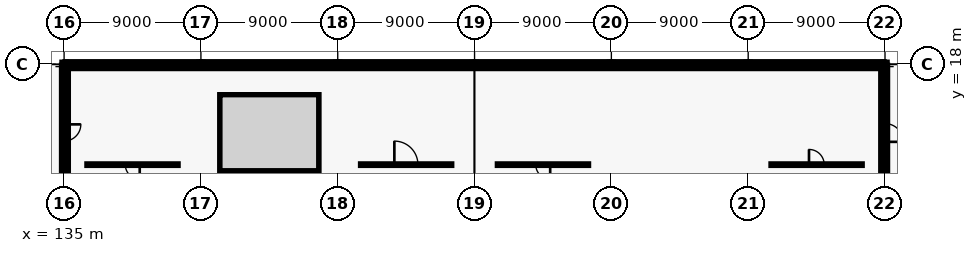
"""IFC4 building model, lengths in metres.
Left out: names, types, materials, properties, quantities, classifications, styles, units other than length and angle.
Written with IfcOpenShell. Run it as: python <this file> out.ifc"""

import sys

from ifc_helpers import new_model, si_unit, direction, frame, frame_2d, origin, origin_2d, place, context, subcontext, project, spatial, rectangle, i_section, extrude, element, fill, save


model = new_model("IFC4")
c1 = context("Model", 3, precision=1e-05, world=origin(), true_north=direction((0.0, 1.0)))
c2 = subcontext(c1, "Body", "Model", "MODEL_VIEW")
j1 = project(units=[si_unit("LENGTHUNIT", "METRE"), si_unit("PLANEANGLEUNIT", "RADIAN")], contexts=[c1])
p1 = place(None, origin())
s1 = spatial("IfcSite", under=j1, at=p1, CompositionType="ELEMENT")
p2 = place(p1, origin())
s2 = spatial("IfcBuilding", under=s1, at=p2, CompositionType="ELEMENT")
p3 = place(p2, frame((0.0, 0.0, 13.5)))
s3 = spatial("IfcBuildingStorey", under=s2, at=p3, CompositionType="ELEMENT", Elevation=13.5)
for number, where, z_axis, x_axis in (
    (1, (135.0, 18.0, 0.0), (0.0, 0.0, 1.0), (1.0, 0.0, 0.0)),
    (2, (144.0, 18.0, 0.0), (0.0, 0.0, 1.0), (1.0, 0.0, 0.0)),
    (3, (153.0, 18.0, 0.0), (0.0, 0.0, 1.0), (1.0, 0.0, 0.0)),
    (4, (162.0, 18.0, 0.0), (0.0, 0.0, 1.0), (1.0, 0.0, 0.0)),
    (5, (171.0, 18.0, 0.0), (0.0, 0.0, 1.0), (1.0, 0.0, 0.0)),
    (6, (180.0, 18.0, 0.0), (0.0, 0.0, 1.0), (1.0, 0.0, 0.0)),
    (7, (189.0, 18.0, 0.0), (0.0, 0.0, 1.0), (1.0, 0.0, 0.0)),
):
    element("IfcColumn", number, at=place(p3, frame(where, z_axis=z_axis, x_axis=x_axis)), inside=s3, PredefinedType="COLUMN", context=c2, shape_type="SweptSolid", body=[
        extrude(i_section(OverallWidth=0.28, OverallDepth=0.28, WebThickness=0.01, FlangeThickness=0.018, FilletRadius=0.024, at=origin_2d()), origin(), (0.0, 0.0, 1.0), 3.9),
    ])
p4 = place(p3, frame((135.06, 18.0, 0.0), z_axis=(0.0, 0.0, 1.0), x_axis=(1.0, 0.0, 0.0)))
e8 = element("IfcWall", 8, at=p4, inside=s3, PredefinedType="SOLIDWALL", context=c2, shape_type="SweptSolid", body=[
    extrude(rectangle(XDim=8.88, YDim=0.34, at=frame_2d((4.44, 0.0))), origin(), (0.0, 0.0, 1.0), 3.2),
])
p5 = place(p4, frame((1.486, 0.0, 0.9)))
e9 = element("IfcOpeningElement", 9, at=p5, cuts=e8, PredefinedType="OPENING", context=c2, shape_type="SweptSolid", body=[
    extrude(rectangle(XDim=2.0, YDim=1.5, at=frame_2d((1.0, 0.75))), frame((0.0, 0.18, 0.0), z_axis=(0.0, -1.0, 0.0), x_axis=(1.0, 0.0, 0.0)), (0.0, 0.0, 1.0), 0.36),
])
p6 = place(p4, frame((5.394, 0.0, 0.9)))
e10 = element("IfcOpeningElement", 10, at=p6, cuts=e8, PredefinedType="OPENING", context=c2, shape_type="SweptSolid", body=[
    extrude(rectangle(XDim=2.0, YDim=1.5, at=frame_2d((1.0, 0.75))), frame((0.0, 0.18, 0.0), z_axis=(0.0, -1.0, 0.0), x_axis=(1.0, 0.0, 0.0)), (0.0, 0.0, 1.0), 0.36),
])
p7 = place(p3, frame((144.06, 18.0, 0.0), z_axis=(0.0, 0.0, 1.0), x_axis=(1.0, 0.0, 0.0)))
e11 = element("IfcWall", 11, at=p7, inside=s3, PredefinedType="SOLIDWALL", context=c2, shape_type="SweptSolid", body=[
    extrude(rectangle(XDim=8.88, YDim=0.34, at=frame_2d((4.44, 0.0))), origin(), (0.0, 0.0, 1.0), 3.2),
])
p8 = place(p7, frame((1.186, 0.0, 0.9)))
e12 = element("IfcOpeningElement", 12, at=p8, cuts=e11, PredefinedType="OPENING", context=c2, shape_type="SweptSolid", body=[
    extrude(rectangle(XDim=2.6, YDim=1.4, at=frame_2d((1.3, 0.7))), frame((0.0, 0.18, 0.0), z_axis=(0.0, -1.0, 0.0), x_axis=(1.0, 0.0, 0.0)), (0.0, 0.0, 1.0), 0.36),
])
p9 = place(p7, frame((5.094, 0.0, 0.9)))
e13 = element("IfcOpeningElement", 13, at=p9, cuts=e11, PredefinedType="OPENING", context=c2, shape_type="SweptSolid", body=[
    extrude(rectangle(XDim=2.6, YDim=1.4, at=frame_2d((1.3, 0.7))), frame((0.0, 0.18, 0.0), z_axis=(0.0, -1.0, 0.0), x_axis=(1.0, 0.0, 0.0)), (0.0, 0.0, 1.0), 0.36),
])
p10 = place(p3, frame((153.06, 18.0, 0.0), z_axis=(0.0, 0.0, 1.0), x_axis=(1.0, 0.0, 0.0)))
e14 = element("IfcWall", 14, at=p10, inside=s3, PredefinedType="SOLIDWALL", context=c2, shape_type="SweptSolid", body=[
    extrude(rectangle(XDim=8.88, YDim=0.34, at=frame_2d((4.44, 0.0))), origin(), (0.0, 0.0, 1.0), 3.2),
])
p11 = place(p10, frame((1.486, 0.0, 0.9)))
e15 = element("IfcOpeningElement", 15, at=p11, cuts=e14, PredefinedType="OPENING", context=c2, shape_type="SweptSolid", body=[
    extrude(rectangle(XDim=2.0, YDim=1.5, at=frame_2d((1.0, 0.75))), frame((0.0, 0.18, 0.0), z_axis=(0.0, -1.0, 0.0), x_axis=(1.0, 0.0, 0.0)), (0.0, 0.0, 1.0), 0.36),
])
p12 = place(p10, frame((5.394, 0.0, 0.9)))
e16 = element("IfcOpeningElement", 16, at=p12, cuts=e14, PredefinedType="OPENING", context=c2, shape_type="SweptSolid", body=[
    extrude(rectangle(XDim=2.0, YDim=1.5, at=frame_2d((1.0, 0.75))), frame((0.0, 0.18, 0.0), z_axis=(0.0, -1.0, 0.0), x_axis=(1.0, 0.0, 0.0)), (0.0, 0.0, 1.0), 0.36),
])
p13 = place(p3, frame((162.06, 18.0, 0.0), z_axis=(0.0, 0.0, 1.0), x_axis=(1.0, 0.0, 0.0)))
e17 = element("IfcWall", 17, at=p13, inside=s3, PredefinedType="SOLIDWALL", context=c2, shape_type="SweptSolid", body=[
    extrude(rectangle(XDim=8.88, YDim=0.34, at=frame_2d((4.44, 0.0))), origin(), (0.0, 0.0, 1.0), 3.2),
])
p14 = place(p13, frame((1.186, 0.0, 0.9)))
e18 = element("IfcOpeningElement", 18, at=p14, cuts=e17, PredefinedType="OPENING", context=c2, shape_type="SweptSolid", body=[
    extrude(rectangle(XDim=2.6, YDim=1.4, at=frame_2d((1.3, 0.7))), frame((0.0, 0.18, 0.0), z_axis=(0.0, -1.0, 0.0), x_axis=(1.0, 0.0, 0.0)), (0.0, 0.0, 1.0), 0.36),
])
p15 = place(p13, frame((5.094, 0.0, 0.9)))
e19 = element("IfcOpeningElement", 19, at=p15, cuts=e17, PredefinedType="OPENING", context=c2, shape_type="SweptSolid", body=[
    extrude(rectangle(XDim=2.6, YDim=1.4, at=frame_2d((1.3, 0.7))), frame((0.0, 0.18, 0.0), z_axis=(0.0, -1.0, 0.0), x_axis=(1.0, 0.0, 0.0)), (0.0, 0.0, 1.0), 0.36),
])
p16 = place(p3, frame((171.06, 18.0, 0.0), z_axis=(0.0, 0.0, 1.0), x_axis=(1.0, 0.0, 0.0)))
e20 = element("IfcWall", 20, at=p16, inside=s3, PredefinedType="SOLIDWALL", context=c2, shape_type="SweptSolid", body=[
    extrude(rectangle(XDim=8.88, YDim=0.34, at=frame_2d((4.44, 0.0))), origin(), (0.0, 0.0, 1.0), 3.2),
])
p17 = place(p16, frame((1.486, 0.0, 0.9)))
e21 = element("IfcOpeningElement", 21, at=p17, cuts=e20, PredefinedType="OPENING", context=c2, shape_type="SweptSolid", body=[
    extrude(rectangle(XDim=2.0, YDim=1.5, at=frame_2d((1.0, 0.75))), frame((0.0, 0.18, 0.0), z_axis=(0.0, -1.0, 0.0), x_axis=(1.0, 0.0, 0.0)), (0.0, 0.0, 1.0), 0.36),
])
p18 = place(p16, frame((5.394, 0.0, 0.9)))
e22 = element("IfcOpeningElement", 22, at=p18, cuts=e20, PredefinedType="OPENING", context=c2, shape_type="SweptSolid", body=[
    extrude(rectangle(XDim=2.0, YDim=1.5, at=frame_2d((1.0, 0.75))), frame((0.0, 0.18, 0.0), z_axis=(0.0, -1.0, 0.0), x_axis=(1.0, 0.0, 0.0)), (0.0, 0.0, 1.0), 0.36),
])
p19 = place(p3, frame((180.06, 18.0, 0.0), z_axis=(0.0, 0.0, 1.0), x_axis=(1.0, 0.0, 0.0)))
e23 = element("IfcWall", 23, at=p19, inside=s3, PredefinedType="SOLIDWALL", context=c2, shape_type="SweptSolid", body=[
    extrude(rectangle(XDim=8.88, YDim=0.34, at=frame_2d((4.44, 0.0))), origin(), (0.0, 0.0, 1.0), 3.2),
])
p20 = place(p19, frame((1.186, 0.0, 0.9)))
e24 = element("IfcOpeningElement", 24, at=p20, cuts=e23, PredefinedType="OPENING", context=c2, shape_type="SweptSolid", body=[
    extrude(rectangle(XDim=2.6, YDim=1.4, at=frame_2d((1.3, 0.7))), frame((0.0, 0.18, 0.0), z_axis=(0.0, -1.0, 0.0), x_axis=(1.0, 0.0, 0.0)), (0.0, 0.0, 1.0), 0.36),
])
p21 = place(p19, frame((5.094, 0.0, 0.9)))
e25 = element("IfcOpeningElement", 25, at=p21, cuts=e23, PredefinedType="OPENING", context=c2, shape_type="SweptSolid", body=[
    extrude(rectangle(XDim=2.6, YDim=1.4, at=frame_2d((1.3, 0.7))), frame((0.0, 0.18, 0.0), z_axis=(0.0, -1.0, 0.0), x_axis=(1.0, 0.0, 0.0)), (0.0, 0.0, 1.0), 0.36),
])
p22 = place(p3, frame((135.0, 9.06, 0.0), z_axis=(0.0, 0.0, 1.0), x_axis=(0.0, 1.0, 0.0)))
e26 = element("IfcWall", 26, at=p22, inside=s3, PredefinedType="SOLIDWALL", context=c2, shape_type="SweptSolid", body=[
    extrude(rectangle(XDim=8.88, YDim=0.34, at=frame_2d((4.44, 0.0))), origin(), (0.0, 0.0, 1.0), 3.2),
])
p23 = place(p22, frame((3.89, 0.0, 0.0)))
e27 = element("IfcOpeningElement", 27, at=p23, cuts=e26, PredefinedType="OPENING", context=c2, shape_type="SweptSolid", body=[
    extrude(rectangle(XDim=1.1, YDim=2.15, at=frame_2d((0.55, 1.075))), frame((0.0, 0.18, 0.0), z_axis=(0.0, -1.0, 0.0), x_axis=(1.0, 0.0, 0.0)), (0.0, 0.0, 1.0), 0.36),
])
p24 = place(p3, frame((189.0, 9.06, 0.0), z_axis=(0.0, 0.0, 1.0), x_axis=(0.0, 1.0, 0.0)))
e28 = element("IfcWall", 28, at=p24, inside=s3, PredefinedType="SOLIDWALL", context=c2, shape_type="SweptSolid", body=[
    extrude(rectangle(XDim=8.88, YDim=0.34, at=frame_2d((4.44, 0.0))), origin(), (0.0, 0.0, 1.0), 3.2),
])
p25 = place(p24, frame((3.84, 0.0, 0.0)))
e29 = element("IfcOpeningElement", 29, at=p25, cuts=e28, PredefinedType="OPENING", context=c2, shape_type="SweptSolid", body=[
    extrude(rectangle(XDim=1.2, YDim=2.15, at=frame_2d((0.6, 1.075))), frame((0.0, 0.18, 0.0), z_axis=(0.0, -1.0, 0.0), x_axis=(1.0, 0.0, 0.0)), (0.0, 0.0, 1.0), 0.36),
])
p26 = place(p3, frame((135.14, 17.86, 3.9), z_axis=(0.0, 0.0, 1.0), x_axis=(1.0, 0.0, 0.0)))
e30 = element("IfcWall", 30, at=p26, inside=s3, PredefinedType="PARAPET", context=c2, shape_type="SweptSolid", body=[
    extrude(rectangle(XDim=53.72, YDim=0.28, at=frame_2d((26.86, 0.0))), origin(), (0.0, 0.0, 1.0), 1.2),
])
for number, where, z_axis, x_axis in (
    (31, (135.14, 0.14, 3.9), (0.0, 0.0, 1.0), (0.0, 1.0, 0.0)),
    (32, (188.86, 0.14, 3.9), (0.0, 0.0, 1.0), (0.0, 1.0, 0.0)),
):
    element("IfcWall", number, at=place(p3, frame(where, z_axis=z_axis, x_axis=x_axis)), inside=s3, PredefinedType="PARAPET", context=c2, shape_type="SweptSolid", body=[
        extrude(rectangle(XDim=17.72, YDim=0.28, at=frame_2d((8.86, 0.0))), origin(), (0.0, 0.0, 1.0), 1.2),
    ])
p27 = place(p3, frame((136.5, 11.4, 0.0), z_axis=(0.0, 0.0, 1.0), x_axis=(1.0, 0.0, 0.0)))
e33 = element("IfcWall", 33, at=p27, inside=s3, PredefinedType="PARTITIONING", context=c2, shape_type="SweptSolid", body=[
    extrude(rectangle(XDim=6.0, YDim=0.1, at=frame_2d((3.0, 0.0))), origin(), (0.0, 0.0, 1.0), 2.9),
])
p28 = place(p27, frame((2.525, 0.0, 0.0)))
e34 = element("IfcOpeningElement", 34, at=p28, cuts=e33, PredefinedType="OPENING", context=c2, shape_type="SweptSolid", body=[
    extrude(rectangle(XDim=0.95, YDim=2.1, at=frame_2d((0.475, 1.05))), frame((0.0, 0.06, 0.0), z_axis=(0.0, -1.0, 0.0), x_axis=(1.0, 0.0, 0.0)), (0.0, 0.0, 1.0), 0.12),
])
p29 = place(p3, frame((154.5, 11.4, 0.0), z_axis=(0.0, 0.0, 1.0), x_axis=(1.0, 0.0, 0.0)))
e35 = element("IfcWall", 35, at=p29, inside=s3, PredefinedType="PARTITIONING", context=c2, shape_type="SweptSolid", body=[
    extrude(rectangle(XDim=6.0, YDim=0.1, at=frame_2d((3.0, 0.0))), origin(), (0.0, 0.0, 1.0), 2.9),
])
p30 = place(p29, frame((2.225, 0.0, 0.0)))
e36 = element("IfcOpeningElement", 36, at=p30, cuts=e35, PredefinedType="OPENING", context=c2, shape_type="SweptSolid", body=[
    extrude(rectangle(XDim=1.55, YDim=2.25, at=frame_2d((0.775, 1.125))), frame((0.0, 0.06, 0.0), z_axis=(0.0, -1.0, 0.0), x_axis=(1.0, 0.0, 0.0)), (0.0, 0.0, 1.0), 0.12),
])
p31 = place(p3, frame((163.5, 11.4, 0.0), z_axis=(0.0, 0.0, 1.0), x_axis=(1.0, 0.0, 0.0)))
e37 = element("IfcWall", 37, at=p31, inside=s3, PredefinedType="PARTITIONING", context=c2, shape_type="SweptSolid", body=[
    extrude(rectangle(XDim=6.0, YDim=0.1, at=frame_2d((3.0, 0.0))), origin(), (0.0, 0.0, 1.0), 2.9),
])
p32 = place(p31, frame((2.525, 0.0, 0.0)))
e38 = element("IfcOpeningElement", 38, at=p32, cuts=e37, PredefinedType="OPENING", context=c2, shape_type="SweptSolid", body=[
    extrude(rectangle(XDim=0.95, YDim=2.1, at=frame_2d((0.475, 1.05))), frame((0.0, 0.06, 0.0), z_axis=(0.0, -1.0, 0.0), x_axis=(1.0, 0.0, 0.0)), (0.0, 0.0, 1.0), 0.12),
])
p33 = place(p3, frame((181.5, 11.4, 0.0), z_axis=(0.0, 0.0, 1.0), x_axis=(1.0, 0.0, 0.0)))
e39 = element("IfcWall", 39, at=p33, inside=s3, PredefinedType="PARTITIONING", context=c2, shape_type="SweptSolid", body=[
    extrude(rectangle(XDim=6.0, YDim=0.1, at=frame_2d((3.0, 0.0))), origin(), (0.0, 0.0, 1.0), 2.9),
])
p34 = place(p33, frame((2.5, 0.0, 0.0)))
e40 = element("IfcOpeningElement", 40, at=p34, cuts=e39, PredefinedType="OPENING", context=c2, shape_type="SweptSolid", body=[
    extrude(rectangle(XDim=1.0, YDim=2.1, at=frame_2d((0.5, 1.05))), frame((0.0, 0.06, 0.0), z_axis=(0.0, -1.0, 0.0), x_axis=(1.0, 0.0, 0.0)), (0.0, 0.0, 1.0), 0.12),
])
p35 = place(p5, origin())
e41 = element("IfcWindow", 41, at=p35, inside=s3, PartitioningType="SINGLE_PANEL", PredefinedType="WINDOW", context=c2, shape_type="SweptSolid", body=[
    extrude(rectangle(XDim=2.0, YDim=1.5, at=frame_2d((1.0, 0.75))), frame((0.0, 0.03, 0.0), z_axis=(0.0, -1.0, 0.0), x_axis=(1.0, 0.0, 0.0)), (0.0, 0.0, 1.0), 0.06),
])
fill(e9, e41)
p36 = place(p6, origin())
e42 = element("IfcWindow", 42, at=p36, inside=s3, PartitioningType="SINGLE_PANEL", PredefinedType="WINDOW", context=c2, shape_type="SweptSolid", body=[
    extrude(rectangle(XDim=2.0, YDim=1.5, at=frame_2d((1.0, 0.75))), frame((0.0, 0.03, 0.0), z_axis=(0.0, -1.0, 0.0), x_axis=(1.0, 0.0, 0.0)), (0.0, 0.0, 1.0), 0.06),
])
fill(e10, e42)
p37 = place(p8, origin())
e43 = element("IfcWindow", 43, at=p37, inside=s3, PartitioningType="SINGLE_PANEL", PredefinedType="WINDOW", context=c2, shape_type="SweptSolid", body=[
    extrude(rectangle(XDim=2.6, YDim=1.4, at=frame_2d((1.3, 0.7))), frame((0.0, 0.03, 0.0), z_axis=(0.0, -1.0, 0.0), x_axis=(1.0, 0.0, 0.0)), (0.0, 0.0, 1.0), 0.06),
])
fill(e12, e43)
p38 = place(p9, origin())
e44 = element("IfcWindow", 44, at=p38, inside=s3, PartitioningType="SINGLE_PANEL", PredefinedType="WINDOW", context=c2, shape_type="SweptSolid", body=[
    extrude(rectangle(XDim=2.6, YDim=1.4, at=frame_2d((1.3, 0.7))), frame((0.0, 0.03, 0.0), z_axis=(0.0, -1.0, 0.0), x_axis=(1.0, 0.0, 0.0)), (0.0, 0.0, 1.0), 0.06),
])
fill(e13, e44)
p39 = place(p11, origin())
e45 = element("IfcWindow", 45, at=p39, inside=s3, PartitioningType="SINGLE_PANEL", PredefinedType="WINDOW", context=c2, shape_type="SweptSolid", body=[
    extrude(rectangle(XDim=2.0, YDim=1.5, at=frame_2d((1.0, 0.75))), frame((0.0, 0.03, 0.0), z_axis=(0.0, -1.0, 0.0), x_axis=(1.0, 0.0, 0.0)), (0.0, 0.0, 1.0), 0.06),
])
fill(e15, e45)
p40 = place(p12, origin())
e46 = element("IfcWindow", 46, at=p40, inside=s3, PartitioningType="SINGLE_PANEL", PredefinedType="WINDOW", context=c2, shape_type="SweptSolid", body=[
    extrude(rectangle(XDim=2.0, YDim=1.5, at=frame_2d((1.0, 0.75))), frame((0.0, 0.03, 0.0), z_axis=(0.0, -1.0, 0.0), x_axis=(1.0, 0.0, 0.0)), (0.0, 0.0, 1.0), 0.06),
])
fill(e16, e46)
p41 = place(p14, origin())
e47 = element("IfcWindow", 47, at=p41, inside=s3, PartitioningType="SINGLE_PANEL", PredefinedType="WINDOW", context=c2, shape_type="SweptSolid", body=[
    extrude(rectangle(XDim=2.6, YDim=1.4, at=frame_2d((1.3, 0.7))), frame((0.0, 0.03, 0.0), z_axis=(0.0, -1.0, 0.0), x_axis=(1.0, 0.0, 0.0)), (0.0, 0.0, 1.0), 0.06),
])
fill(e18, e47)
p42 = place(p15, origin())
e48 = element("IfcWindow", 48, at=p42, inside=s3, PartitioningType="SINGLE_PANEL", PredefinedType="WINDOW", context=c2, shape_type="SweptSolid", body=[
    extrude(rectangle(XDim=2.6, YDim=1.4, at=frame_2d((1.3, 0.7))), frame((0.0, 0.03, 0.0), z_axis=(0.0, -1.0, 0.0), x_axis=(1.0, 0.0, 0.0)), (0.0, 0.0, 1.0), 0.06),
])
fill(e19, e48)
p43 = place(p17, origin())
e49 = element("IfcWindow", 49, at=p43, inside=s3, PartitioningType="SINGLE_PANEL", PredefinedType="WINDOW", context=c2, shape_type="SweptSolid", body=[
    extrude(rectangle(XDim=2.0, YDim=1.5, at=frame_2d((1.0, 0.75))), frame((0.0, 0.03, 0.0), z_axis=(0.0, -1.0, 0.0), x_axis=(1.0, 0.0, 0.0)), (0.0, 0.0, 1.0), 0.06),
])
fill(e21, e49)
p44 = place(p18, origin())
e50 = element("IfcWindow", 50, at=p44, inside=s3, PartitioningType="SINGLE_PANEL", PredefinedType="WINDOW", context=c2, shape_type="SweptSolid", body=[
    extrude(rectangle(XDim=2.0, YDim=1.5, at=frame_2d((1.0, 0.75))), frame((0.0, 0.03, 0.0), z_axis=(0.0, -1.0, 0.0), x_axis=(1.0, 0.0, 0.0)), (0.0, 0.0, 1.0), 0.06),
])
fill(e22, e50)
p45 = place(p20, origin())
e51 = element("IfcWindow", 51, at=p45, inside=s3, PartitioningType="SINGLE_PANEL", PredefinedType="WINDOW", context=c2, shape_type="SweptSolid", body=[
    extrude(rectangle(XDim=2.6, YDim=1.4, at=frame_2d((1.3, 0.7))), frame((0.0, 0.03, 0.0), z_axis=(0.0, -1.0, 0.0), x_axis=(1.0, 0.0, 0.0)), (0.0, 0.0, 1.0), 0.06),
])
fill(e24, e51)
p46 = place(p21, origin())
e52 = element("IfcWindow", 52, at=p46, inside=s3, PartitioningType="SINGLE_PANEL", PredefinedType="WINDOW", context=c2, shape_type="SweptSolid", body=[
    extrude(rectangle(XDim=2.6, YDim=1.4, at=frame_2d((1.3, 0.7))), frame((0.0, 0.03, 0.0), z_axis=(0.0, -1.0, 0.0), x_axis=(1.0, 0.0, 0.0)), (0.0, 0.0, 1.0), 0.06),
])
fill(e25, e52)
p47 = place(p23, origin())
e53 = element("IfcDoor", 53, at=p47, inside=s3, OperationType="SINGLE_SWING_RIGHT", PredefinedType="DOOR", context=c2, shape_type="SweptSolid", body=[
    extrude(rectangle(XDim=1.1, YDim=2.15, at=frame_2d((0.55, 1.075))), frame((0.0, 0.025, 0.0), z_axis=(0.0, -1.0, 0.0), x_axis=(1.0, 0.0, 0.0)), (0.0, 0.0, 1.0), 0.05),
])
fill(e27, e53)
p48 = place(p25, frame((1.2, 0.0, 0.0), z_axis=(0.0, 0.0, 1.0), x_axis=(-1.0, 0.0, 0.0)))
e54 = element("IfcDoor", 54, at=p48, inside=s3, OperationType="SINGLE_SWING_LEFT", PredefinedType="DOOR", context=c2, shape_type="SweptSolid", body=[
    extrude(rectangle(XDim=1.2, YDim=2.15, at=frame_2d((0.6, 1.075))), frame((0.0, 0.025, 0.0), z_axis=(0.0, -1.0, 0.0), x_axis=(1.0, 0.0, 0.0)), (0.0, 0.0, 1.0), 0.05),
])
fill(e29, e54)
p49 = place(p28, origin())
e55 = element("IfcDoor", 55, at=p49, inside=s3, OperationType="SINGLE_SWING_RIGHT", PredefinedType="DOOR", context=c2, shape_type="SweptSolid", body=[
    extrude(rectangle(XDim=0.95, YDim=2.1, at=frame_2d((0.475, 1.05))), frame((0.0, 0.025, 0.0), z_axis=(0.0, -1.0, 0.0), x_axis=(1.0, 0.0, 0.0)), (0.0, 0.0, 1.0), 0.05),
])
fill(e34, e55)
p50 = place(p30, origin())
e56 = element("IfcDoor", 56, at=p50, inside=s3, OperationType="SINGLE_SWING_LEFT", PredefinedType="DOOR", context=c2, shape_type="SweptSolid", body=[
    extrude(rectangle(XDim=1.55, YDim=2.25, at=frame_2d((0.775, 1.125))), frame((0.0, 0.025, 0.0), z_axis=(0.0, -1.0, 0.0), x_axis=(1.0, 0.0, 0.0)), (0.0, 0.0, 1.0), 0.05),
])
fill(e36, e56)
p51 = place(p32, origin())
e57 = element("IfcDoor", 57, at=p51, inside=s3, OperationType="SINGLE_SWING_RIGHT", PredefinedType="DOOR", context=c2, shape_type="SweptSolid", body=[
    extrude(rectangle(XDim=0.95, YDim=2.1, at=frame_2d((0.475, 1.05))), frame((0.0, 0.025, 0.0), z_axis=(0.0, -1.0, 0.0), x_axis=(1.0, 0.0, 0.0)), (0.0, 0.0, 1.0), 0.05),
])
fill(e38, e57)
p52 = place(p34, origin())
e58 = element("IfcDoor", 58, at=p52, inside=s3, OperationType="SINGLE_SWING_LEFT", PredefinedType="DOOR", context=c2, shape_type="SweptSolid", body=[
    extrude(rectangle(XDim=1.0, YDim=2.1, at=frame_2d((0.5, 1.05))), frame((0.0, 0.025, 0.0), z_axis=(0.0, -1.0, 0.0), x_axis=(1.0, 0.0, 0.0)), (0.0, 0.0, 1.0), 0.05),
])
fill(e40, e58)
save(model, sys.argv[1])
